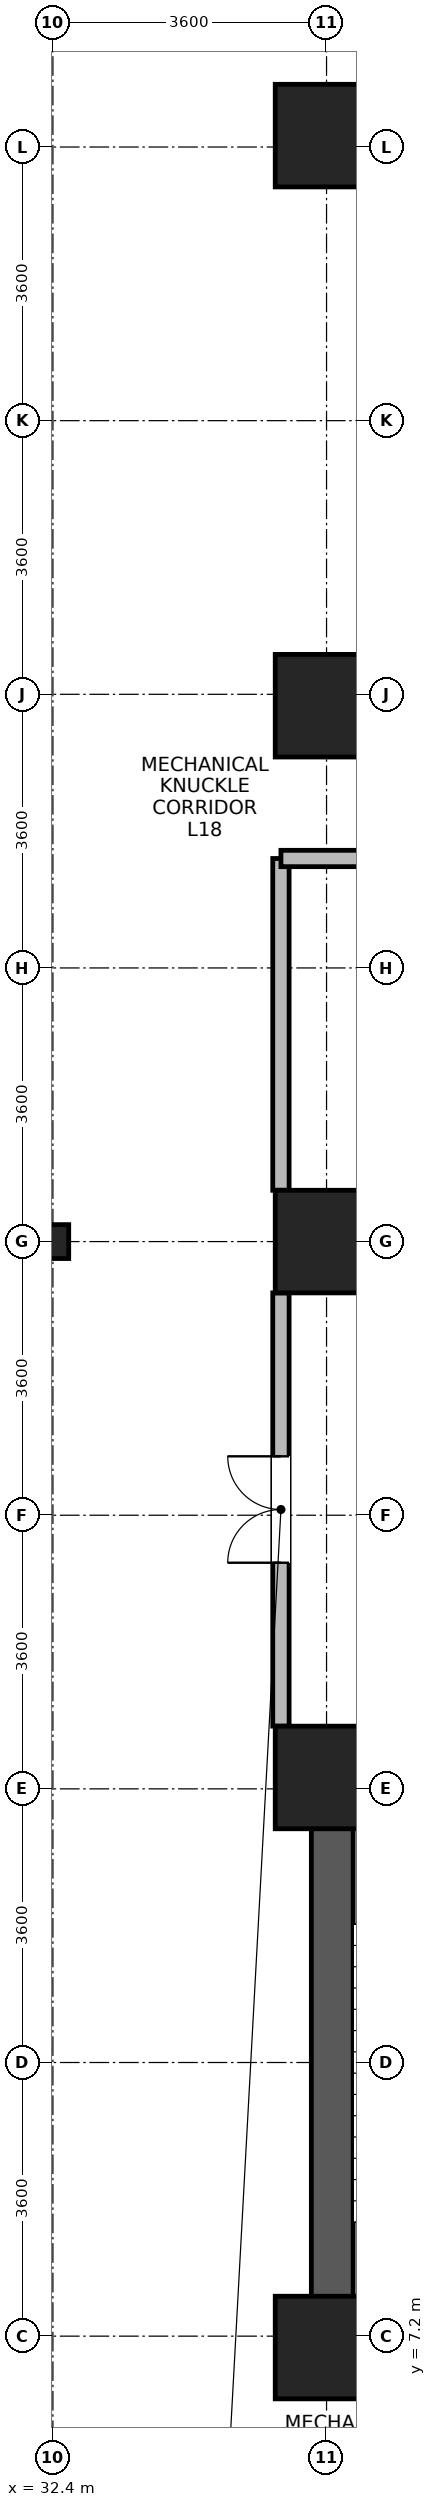
"""IFC4 building model, lengths in metres.
Left out: names, types, materials, properties, quantities, classifications, styles, units other than length and angle.
Written with IfcOpenShell. Run it as: python <this file> out.ifc"""

import sys

from ifc_helpers import new_model, si_unit, direction, frame, frame_2d, origin, origin_2d, place, context, subcontext, project, spatial, rectangle, i_section, extrude, source, transform, mapped, element, fill, save


model = new_model("IFC4")
c1 = context("Model", 3, precision=1e-05, world=origin(), true_north=direction((0.0, 1.0)))
c2 = subcontext(c1, "Body", "Model", "MODEL_VIEW")
j1 = project(units=[si_unit("LENGTHUNIT", "METRE"), si_unit("PLANEANGLEUNIT", "RADIAN")], contexts=[c1])
p1 = place(None, origin())
s1 = spatial("IfcSite", under=j1, at=p1, CompositionType="ELEMENT")
p2 = place(p1, origin())
s2 = spatial("IfcBuilding", under=s1, at=p2, CompositionType="ELEMENT")
p3 = place(p2, frame((0.0, 0.0, 73.4)))
s3 = spatial("IfcBuildingStorey", under=s2, at=p3, CompositionType="ELEMENT", Elevation=73.4)
p4 = place(p3, frame((36.075, 6.75, 0.0), z_axis=(0.0, 0.0, 1.0), x_axis=(0.0, 1.0, 0.0)))
e1 = element("IfcWall", 1, at=p4, inside=s3, PredefinedType="SHEAR", context=c2, shape_type="SweptSolid", body=[
    extrude(rectangle(XDim=8.1, YDim=0.55, at=frame_2d((4.05, 0.0))), origin(), (0.0, 0.0, 1.0), 4.78),
])
for number, where, z_axis, x_axis in (
    (2, (36.35, 7.025, 0.0), (0.0, 0.0, 1.0), (1.0, 0.0, 0.0)),
    (3, (36.35, 14.575, 0.0), (0.0, 0.0, 1.0), (1.0, 0.0, 0.0)),
):
    element("IfcWall", number, at=place(p3, frame(where, z_axis=z_axis, x_axis=x_axis)), inside=s3, PredefinedType="SHEAR", context=c2, shape_type="SweptSolid", body=[
        extrude(rectangle(XDim=3.2, YDim=0.55, at=frame_2d((1.6, 0.0))), origin(), (0.0, 0.0, 1.0), 4.78),
    ])
m1 = source(origin(), c2, "Body", "SweptSolid", [
    extrude(rectangle(XDim=1.35, YDim=1.35, at=origin_2d()), origin(), (0.0, 0.0, 1.0), 5.2),
])
for number, where, z_axis, x_axis in (
    (4, (36.0, 21.6, 0.0), (0.0, 0.0, 1.0), (1.0, 0.0, 0.0)),
    (5, (36.0, 28.65, 0.0), (0.0, 0.0, 1.0), (1.0, 0.0, 0.0)),
    (6, (36.0, 36.15, 0.0), (0.0, 0.0, 1.0), (1.0, 0.0, 0.0)),
    (7, (36.0, 7.05, 0.0), (0.0, 0.0, 1.0), (1.0, 0.0, 0.0)),
    (8, (36.0, 14.55, 0.0), (0.0, 0.0, 1.0), (1.0, 0.0, 0.0)),
):
    element("IfcColumn", number, at=place(p3, frame(where, z_axis=z_axis, x_axis=x_axis)), inside=s3, PredefinedType="COLUMN", context=c2, shape_type="MappedRepresentation", body=[
        mapped(m1, transform((0.0, 0.0, 0.0), x_axis=(1.0, 0.0, 0.0), y_axis=(0.0, 1.0, 0.0), z_axis=(0.0, 0.0, 1.0), scale=1.0)),
    ])
m2 = source(origin(), c2, "Body", "SweptSolid", [
    extrude(i_section(OverallWidth=0.416, OverallDepth=0.446, WebThickness=0.029, FlangeThickness=0.04, FilletRadius=0.015, at=origin_2d()), origin(), (0.0, 0.0, 1.0), 5.2),
])
p5 = place(p3, frame((32.4, 21.6, 0.0), z_axis=(0.0, 0.0, 1.0), x_axis=(1.0, 0.0, 0.0)))
e9 = element("IfcColumn", 9, at=p5, inside=s3, PredefinedType="COLUMN", context=c2, shape_type="MappedRepresentation", body=[
    mapped(m2, transform((0.0, 0.0, 0.0), x_axis=(1.0, 0.0, 0.0), y_axis=(0.0, 1.0, 0.0), z_axis=(0.0, 0.0, 1.0), scale=1.0)),
])
p6 = place(p3, frame((35.4, 15.225, 0.0), z_axis=(0.0, 0.0, 1.0), x_axis=(0.0, 1.0, 0.0)))
e10 = element("IfcWall", 10, at=p6, inside=s3, PredefinedType="PARTITIONING", context=c2, shape_type="SweptSolid", body=[
    extrude(rectangle(XDim=5.7, YDim=0.215, at=frame_2d((2.85, 0.0))), origin(), (0.0, 0.0, 1.0), 4.76),
])
p7 = place(p6, frame((2.15, 0.0, 0.0)))
e11 = element("IfcOpeningElement", 11, at=p7, cuts=e10, PredefinedType="OPENING", context=c2, shape_type="SweptSolid", body=[
    extrude(rectangle(XDim=1.4, YDim=2.15, at=frame_2d((0.7, 1.075))), frame((0.0, 0.118, 0.0), z_axis=(0.0, -1.0, 0.0), x_axis=(1.0, 0.0, 0.0)), (0.0, 0.0, 1.0), 0.235),
])
p8 = place(p3, frame((35.4, 22.275, 0.0), z_axis=(0.0, 0.0, 1.0), x_axis=(0.0, 1.0, 0.0)))
e12 = element("IfcWall", 12, at=p8, inside=s3, PredefinedType="PARTITIONING", context=c2, shape_type="SweptSolid", body=[
    extrude(rectangle(XDim=4.365, YDim=0.215, at=frame_2d((2.183, 0.0))), origin(), (0.0, 0.0, 1.0), 4.76),
])
p9 = place(p3, frame((35.4, 26.64, 0.0), z_axis=(0.0, 0.0, 1.0), x_axis=(1.0, 0.0, 0.0)))
e13 = element("IfcWall", 13, at=p9, inside=s3, PredefinedType="PARTITIONING", context=c2, shape_type="SweptSolid", body=[
    extrude(rectangle(XDim=22.068, YDim=0.215, at=frame_2d((11.034, 0.0))), origin(), (0.0, 0.0, 1.0), 4.76),
])
p10 = place(p7, origin())
e14 = element("IfcDoor", 14, at=p10, inside=s3, OperationType="DOUBLE_DOOR_SINGLE_SWING", PredefinedType="DOOR", context=c2, shape_type="SweptSolid", body=[
    extrude(rectangle(XDim=1.4, YDim=2.15, at=frame_2d((0.7, 1.075))), frame((0.0, 0.025, 0.0), z_axis=(0.0, -1.0, 0.0), x_axis=(1.0, 0.0, 0.0)), (0.0, 0.0, 1.0), 0.05),
])
fill(e11, e14)
save(model, sys.argv[1])
